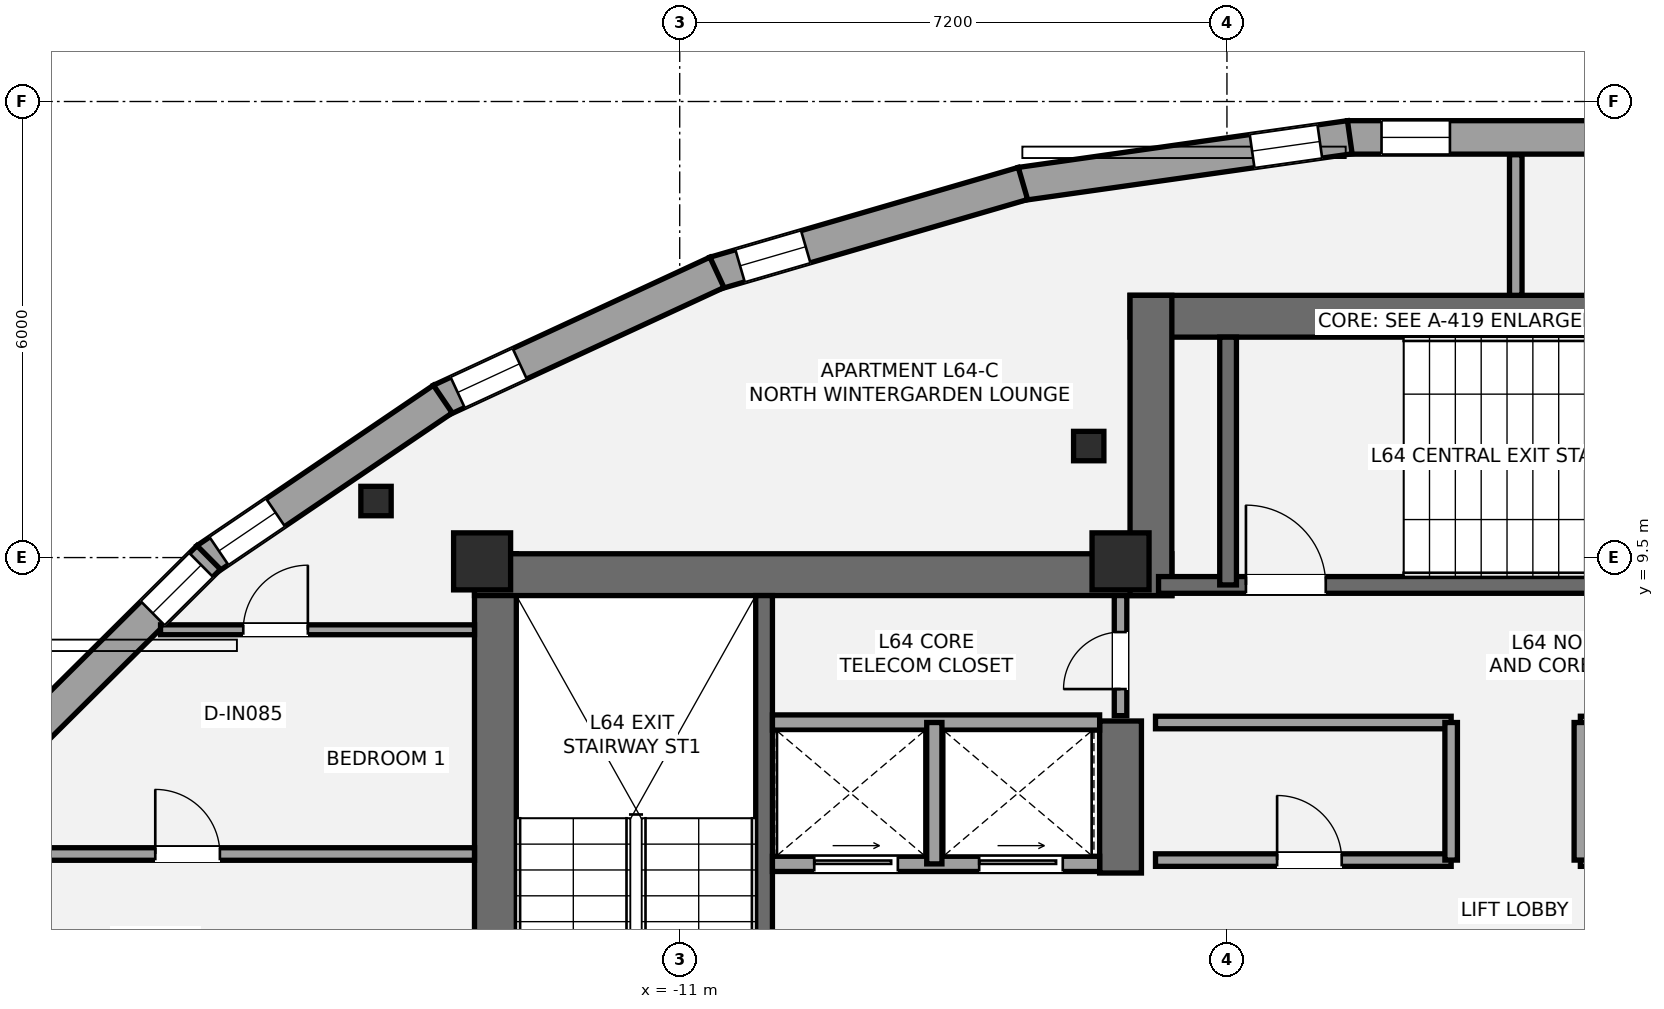
"""IFC4 building model, lengths in metres.
Left out: names, types, materials, properties, quantities, classifications, styles, units other than length and angle.
Written with IfcOpenShell. Run it as: python <this file> out.ifc"""

import sys

from ifc_helpers import new_model, si_unit, direction, frame, frame_2d, origin, origin_2d, place, context, subcontext, project, spatial, rectangle, i_section, extrude, element, fill, save


model = new_model("IFC4")
c1 = context("Model", 3, precision=1e-05, world=origin(), true_north=direction((0.0, 1.0)))
c2 = subcontext(c1, "Body", "Model", "MODEL_VIEW")
j1 = project(units=[si_unit("LENGTHUNIT", "METRE"), si_unit("PLANEANGLEUNIT", "RADIAN")], contexts=[c1])
p1 = place(None, origin())
s1 = spatial("IfcSite", under=j1, at=p1, CompositionType="ELEMENT")
p2 = place(p1, origin())
s2 = spatial("IfcBuilding", under=s1, at=p2, CompositionType="ELEMENT")
p3 = place(p2, frame((0.0, 0.0, 228.9)))
s3 = spatial("IfcBuildingStorey", under=s2, at=p3, CompositionType="ELEMENT", Elevation=228.9)
p4 = place(p3, frame((-13.425, 1.3, 0.0), z_axis=(0.0, 0.0, 1.0), x_axis=(0.0, 1.0, 0.0)))
e1 = element("IfcWall", 1, at=p4, inside=s3, PredefinedType="SHEAR", context=c2, shape_type="SweptSolid", body=[
    extrude(rectangle(XDim=8.25, YDim=0.55, at=frame_2d((4.125, 0.0))), origin(), (0.0, 0.0, 1.0), 3.15),
])
p5 = place(p3, frame((-13.7, 9.275, 0.0), z_axis=(0.0, 0.0, 1.0), x_axis=(1.0, 0.0, 0.0)))
e2 = element("IfcWall", 2, at=p5, inside=s3, PredefinedType="SHEAR", context=c2, shape_type="SweptSolid", body=[
    extrude(rectangle(XDim=9.175, YDim=0.55, at=frame_2d((4.587, 0.0))), origin(), (0.0, 0.0, 1.0), 3.15),
])
p6 = place(p3, frame((-5.2, 5.35, 0.0), z_axis=(0.0, 0.0, 1.0), x_axis=(0.0, 1.0, 0.0)))
e3 = element("IfcWall", 3, at=p6, inside=s3, PredefinedType="SHEAR", context=c2, shape_type="SweptSolid", body=[
    extrude(rectangle(XDim=2.0, YDim=0.55, at=frame_2d((1.0, 0.0))), origin(), (0.0, 0.0, 1.0), 3.15),
])
p7 = place(p3, frame((-9.89, 1.85, 0.0), z_axis=(0.0, 0.0, 1.0), x_axis=(0.0, 1.0, 0.0)))
e4 = element("IfcWall", 4, at=p7, inside=s3, PredefinedType="SHEAR", context=c2, shape_type="SweptSolid", body=[
    extrude(rectangle(XDim=7.15, YDim=0.22, at=frame_2d((3.575, 0.0))), origin(), (0.0, 0.0, 1.0), 3.15),
])
p8 = place(p3, frame((-5.075, 12.675, 0.0), z_axis=(0.0, 0.0, 1.0), x_axis=(1.0, 0.0, 0.0)))
e5 = element("IfcWall", 5, at=p8, inside=s3, PredefinedType="SHEAR", context=c2, shape_type="SweptSolid", body=[
    extrude(rectangle(XDim=10.15, YDim=0.55, at=frame_2d((5.075, 0.0))), origin(), (0.0, 0.0, 1.0), 3.15),
])
p9 = place(p3, frame((-4.8, 9.0, 0.0), z_axis=(0.0, 0.0, 1.0), x_axis=(0.0, 1.0, 0.0)))
e6 = element("IfcWall", 6, at=p9, inside=s3, PredefinedType="SHEAR", context=c2, shape_type="SweptSolid", body=[
    extrude(rectangle(XDim=3.95, YDim=0.55, at=frame_2d((1.975, 0.0))), origin(), (0.0, 0.0, 1.0), 3.15),
])
p10 = place(p3, frame((-4.7, 9.14, 0.0), z_axis=(0.0, 0.0, 1.0), x_axis=(1.0, 0.0, 0.0)))
e7 = element("IfcWall", 7, at=p10, inside=s3, PredefinedType="SHEAR", context=c2, shape_type="SweptSolid", body=[
    extrude(rectangle(XDim=9.3, YDim=0.22, at=frame_2d((4.65, 0.0))), origin(), (0.0, 0.0, 1.0), 3.15),
])
p11 = place(p10, frame((1.15, 0.0, 0.0)))
e8 = element("IfcOpeningElement", 8, at=p11, cuts=e7, PredefinedType="OPENING", context=c2, shape_type="SweptSolid", body=[
    extrude(rectangle(XDim=1.05, YDim=2.15, at=frame_2d((0.525, 1.075))), frame((0.0, 0.12, 0.0), z_axis=(0.0, -1.0, 0.0), x_axis=(1.0, 0.0, 0.0)), (0.0, 0.0, 1.0), 0.24),
])
p12 = place(p3, frame((-3.785, 9.14, 0.0), z_axis=(0.0, 0.0, 1.0), x_axis=(0.0, 1.0, 0.0)))
e9 = element("IfcWall", 9, at=p12, inside=s3, PredefinedType="SHEAR", context=c2, shape_type="SweptSolid", body=[
    extrude(rectangle(XDim=3.26, YDim=0.22, at=frame_2d((1.63, 0.0))), origin(), (0.0, 0.0, 1.0), 3.15),
])
for number, where, z_axis, x_axis in (
    (10, (-13.6, 9.45, 0.0), (0.0, 0.0, 1.0), (1.0, 0.0, 0.0)),
    (11, (-5.2, 9.45, 0.0), (0.0, 0.0, 1.0), (1.0, 0.0, 0.0)),
):
    element("IfcColumn", number, at=place(p3, frame(where, z_axis=z_axis, x_axis=x_axis)), inside=s3, PredefinedType="PILASTER", context=c2, shape_type="SweptSolid", body=[
        extrude(rectangle(XDim=0.75, YDim=0.75, at=origin_2d()), origin(), (0.0, 0.0, 1.0), 3.15),
    ])
for number, where, z_axis, x_axis in (
    (12, (-5.619, 10.967, 0.0), (0.0, 0.0, 1.0), (1.0, 0.0, 0.0)),
    (13, (-14.996, 10.244, 0.0), (0.0, 0.0, 1.0), (1.0, 0.0, 0.0)),
):
    element("IfcColumn", number, at=place(p3, frame(where, z_axis=z_axis, x_axis=x_axis)), inside=s3, PredefinedType="COLUMN", context=c2, shape_type="SweptSolid", body=[
        extrude(i_section(OverallWidth=0.399, OverallDepth=0.387, WebThickness=0.021, FlangeThickness=0.033, at=origin_2d()), origin(), (0.0, 0.0, 1.0), 3.15),
    ])
p13 = place(p3, frame((-2.215, 15.028, 0.0), z_axis=(0.0, 0.0, 1.0), x_axis=(1.0, 0.0, 0.0)))
e14 = element("IfcWall", 14, at=p13, inside=s3, PredefinedType="STANDARD", context=c2, shape_type="SweptSolid", body=[
    extrude(rectangle(XDim=4.429, YDim=0.44, at=frame_2d((2.215, 0.0))), origin(), (0.0, 0.0, 1.0), 2.336),
])
p14 = place(p13, frame((0.448, 0.0, 0.58)))
e15 = element("IfcOpeningElement", 15, at=p14, cuts=e14, PredefinedType="OPENING", context=c2, shape_type="SweptSolid", body=[
    extrude(rectangle(XDim=0.9, YDim=1.35, at=frame_2d((0.45, 0.675))), frame((0.0, 0.23, 0.0), z_axis=(0.0, -1.0, 0.0), x_axis=(1.0, 0.0, 0.0)), (0.0, 0.0, 1.0), 0.46),
])
p15 = place(p3, frame((-6.515, 14.415, 0.0), z_axis=(0.0, 0.0, 1.0), x_axis=(0.990076340622, 0.140530565146, 0.0)))
e16 = element("IfcWall", 16, at=p15, inside=s3, PredefinedType="STANDARD", context=c2, shape_type="SweptSolid", body=[
    extrude(rectangle(XDim=4.375, YDim=0.44, at=frame_2d((2.187, 0.0))), origin(), (0.0, 0.0, 1.0), 2.336),
])
p16 = place(p15, frame((3.076, 0.0, 0.58)))
e17 = element("IfcOpeningElement", 17, at=p16, cuts=e16, PredefinedType="OPENING", context=c2, shape_type="SweptSolid", body=[
    extrude(rectangle(XDim=0.9, YDim=1.35, at=frame_2d((0.45, 0.675))), frame((0.0, 0.23, 0.0), z_axis=(0.0, -1.0, 0.0), x_axis=(1.0, 0.0, 0.0)), (0.0, 0.0, 1.0), 0.46),
])
p17 = place(p3, frame((-10.541, 13.24, 0.0), z_axis=(0.0, 0.0, 1.0), x_axis=(0.960138362531, 0.279525177393, 0.0)))
e18 = element("IfcWall", 18, at=p17, inside=s3, PredefinedType="STANDARD", context=c2, shape_type="SweptSolid", body=[
    extrude(rectangle(XDim=4.226, YDim=0.44, at=frame_2d((2.113, 0.0))), origin(), (0.0, 0.0, 1.0), 2.336),
])
p18 = place(p17, frame((0.349, 0.0, 0.58)))
e19 = element("IfcOpeningElement", 19, at=p18, cuts=e18, PredefinedType="OPENING", context=c2, shape_type="SweptSolid", body=[
    extrude(rectangle(XDim=0.9, YDim=1.35, at=frame_2d((0.45, 0.675))), frame((0.0, 0.23, 0.0), z_axis=(0.0, -1.0, 0.0), x_axis=(1.0, 0.0, 0.0)), (0.0, 0.0, 1.0), 0.46),
])
p19 = place(p3, frame((-14.148, 11.567, 0.0), z_axis=(0.0, 0.0, 1.0), x_axis=(0.907400682183, 0.420266584412, 0.0)))
e20 = element("IfcWall", 20, at=p19, inside=s3, PredefinedType="STANDARD", context=c2, shape_type="SweptSolid", body=[
    extrude(rectangle(XDim=4.009, YDim=0.44, at=frame_2d((2.004, 0.0))), origin(), (0.0, 0.0, 1.0), 2.336),
])
p20 = place(p19, frame((0.249, 0.0, 0.58)))
e21 = element("IfcOpeningElement", 21, at=p20, cuts=e20, PredefinedType="OPENING", context=c2, shape_type="SweptSolid", body=[
    extrude(rectangle(XDim=0.9, YDim=1.35, at=frame_2d((0.45, 0.675))), frame((0.0, 0.23, 0.0), z_axis=(0.0, -1.0, 0.0), x_axis=(1.0, 0.0, 0.0)), (0.0, 0.0, 1.0), 0.46),
])
p21 = place(p3, frame((-17.228, 9.475, 0.0), z_axis=(0.0, 0.0, 1.0), x_axis=(0.827638454008, 0.561261605178, 0.0)))
e22 = element("IfcWall", 22, at=p21, inside=s3, PredefinedType="STANDARD", context=c2, shape_type="SweptSolid", body=[
    extrude(rectangle(XDim=3.76, YDim=0.44, at=frame_2d((1.88, 0.0))), origin(), (0.0, 0.0, 1.0), 2.336),
])
p22 = place(p21, frame((0.2, 0.0, 0.42)))
e23 = element("IfcOpeningElement", 23, at=p22, cuts=e22, PredefinedType="OPENING", context=c2, shape_type="SweptSolid", body=[
    extrude(rectangle(XDim=0.9, YDim=1.35, at=frame_2d((0.45, 0.675))), frame((0.0, 0.23, 0.0), z_axis=(0.0, -1.0, 0.0), x_axis=(1.0, 0.0, 0.0)), (0.0, 0.0, 1.0), 0.46),
])
p23 = place(p3, frame((-19.681, 7.034, 0.0), z_axis=(0.0, 0.0, 1.0), x_axis=(0.709543258305, 0.704661879623, 0.0)))
e24 = element("IfcWall", 24, at=p23, inside=s3, PredefinedType="STANDARD", context=c2, shape_type="SweptSolid", body=[
    extrude(rectangle(XDim=3.501, YDim=0.44, at=frame_2d((1.75, 0.0))), origin(), (0.0, 0.0, 1.0), 2.336),
])
p24 = place(p23, frame((2.461, 0.0, 0.42)))
e25 = element("IfcOpeningElement", 25, at=p24, cuts=e24, PredefinedType="OPENING", context=c2, shape_type="SweptSolid", body=[
    extrude(rectangle(XDim=0.9, YDim=1.35, at=frame_2d((0.45, 0.675))), frame((0.0, 0.23, 0.0), z_axis=(0.0, -1.0, 0.0), x_axis=(1.0, 0.0, 0.0)), (0.0, 0.0, 1.0), 0.46),
])
p25 = place(p3, frame((-9.78, 5.47, 0.0), z_axis=(0.0, 0.0, 1.0), x_axis=(1.0, 0.0, 0.0)))
e26 = element("IfcWall", 26, at=p25, inside=s3, PredefinedType="SOLIDWALL", context=c2, shape_type="SweptSolid", body=[
    extrude(rectangle(XDim=4.305, YDim=0.2, at=frame_2d((2.152, 0.0))), origin(), (0.0, 0.0, 1.0), 2.97),
])
p26 = place(p25, frame((0.55, 0.0, 0.0)))
e27 = element("IfcOpeningElement", 27, at=p26, cuts=e26, PredefinedType="OPENING", context=c2, shape_type="SweptSolid", body=[
    extrude(rectangle(XDim=1.1, YDim=2.2, at=frame_2d((0.55, 1.1))), frame((0.0, 0.11, 0.0), z_axis=(0.0, -1.0, 0.0), x_axis=(1.0, 0.0, 0.0)), (0.0, 0.0, 1.0), 0.22),
])
p27 = place(p25, frame((2.72, 0.0, 0.0)))
e28 = element("IfcOpeningElement", 28, at=p27, cuts=e26, PredefinedType="OPENING", context=c2, shape_type="SweptSolid", body=[
    extrude(rectangle(XDim=1.1, YDim=2.2, at=frame_2d((0.55, 1.1))), frame((0.0, 0.11, 0.0), z_axis=(0.0, -1.0, 0.0), x_axis=(1.0, 0.0, 0.0)), (0.0, 0.0, 1.0), 0.22),
])
p28 = place(p3, frame((-9.78, 7.33, 0.0), z_axis=(0.0, 0.0, 1.0), x_axis=(1.0, 0.0, 0.0)))
e29 = element("IfcWall", 29, at=p28, inside=s3, PredefinedType="SOLIDWALL", context=c2, shape_type="SweptSolid", body=[
    extrude(rectangle(XDim=4.305, YDim=0.2, at=frame_2d((2.152, 0.0))), origin(), (0.0, 0.0, 1.0), 2.97),
])
p29 = place(p3, frame((-7.65, 5.47, 0.0), z_axis=(0.0, 0.0, 1.0), x_axis=(0.0, 1.0, 0.0)))
e30 = element("IfcWall", 30, at=p29, inside=s3, PredefinedType="SOLIDWALL", context=c2, shape_type="SweptSolid", body=[
    extrude(rectangle(XDim=1.86, YDim=0.2, at=frame_2d((0.93, 0.0))), origin(), (0.0, 0.0, 1.0), 2.97),
])
p30 = place(p3, frame((-4.74, 5.52, 0.0), z_axis=(0.0, 0.0, 1.0), x_axis=(1.0, 0.0, 0.0)))
e31 = element("IfcWall", 31, at=p30, inside=s3, PredefinedType="PARTITIONING", context=c2, shape_type="SweptSolid", body=[
    extrude(rectangle(XDim=3.89, YDim=0.165, at=frame_2d((1.945, 0.0))), origin(), (0.0, 0.0, 1.0), 2.97),
])
p31 = place(p30, frame((1.6, 0.0, 0.0)))
e32 = element("IfcOpeningElement", 32, at=p31, cuts=e31, PredefinedType="OPENING", context=c2, shape_type="SweptSolid", body=[
    extrude(rectangle(XDim=0.85, YDim=2.1, at=frame_2d((0.425, 1.05))), frame((0.0, 0.093, 0.0), z_axis=(0.0, -1.0, 0.0), x_axis=(1.0, 0.0, 0.0)), (0.0, 0.0, 1.0), 0.185),
])
p32 = place(p3, frame((-4.74, 7.33, 0.0), z_axis=(0.0, 0.0, 1.0), x_axis=(1.0, 0.0, 0.0)))
e33 = element("IfcWall", 33, at=p32, inside=s3, PredefinedType="PARTITIONING", context=c2, shape_type="SweptSolid", body=[
    extrude(rectangle(XDim=3.89, YDim=0.165, at=frame_2d((1.945, 0.0))), origin(), (0.0, 0.0, 1.0), 2.97),
])
p33 = place(p3, frame((-0.85, 5.52, 0.0), z_axis=(0.0, 0.0, 1.0), x_axis=(0.0, 1.0, 0.0)))
e34 = element("IfcWall", 34, at=p33, inside=s3, PredefinedType="PARTITIONING", context=c2, shape_type="SweptSolid", body=[
    extrude(rectangle(XDim=1.81, YDim=0.165, at=frame_2d((0.905, 0.0))), origin(), (0.0, 0.0, 1.0), 2.97),
])
p34 = place(p3, frame((0.85, 5.52, 0.0), z_axis=(0.0, 0.0, 1.0), x_axis=(1.0, 0.0, 0.0)))
e35 = element("IfcWall", 35, at=p34, inside=s3, PredefinedType="PARTITIONING", context=c2, shape_type="SweptSolid", body=[
    extrude(rectangle(XDim=3.89, YDim=0.165, at=frame_2d((1.945, 0.0))), origin(), (0.0, 0.0, 1.0), 2.97),
])
p35 = place(p34, frame((1.6, 0.0, 0.0)))
e36 = element("IfcOpeningElement", 36, at=p35, cuts=e35, PredefinedType="OPENING", context=c2, shape_type="SweptSolid", body=[
    extrude(rectangle(XDim=0.85, YDim=2.1, at=frame_2d((0.425, 1.05))), frame((0.0, 0.093, 0.0), z_axis=(0.0, -1.0, 0.0), x_axis=(1.0, 0.0, 0.0)), (0.0, 0.0, 1.0), 0.185),
])
p36 = place(p3, frame((0.85, 7.33, 0.0), z_axis=(0.0, 0.0, 1.0), x_axis=(1.0, 0.0, 0.0)))
e37 = element("IfcWall", 37, at=p36, inside=s3, PredefinedType="PARTITIONING", context=c2, shape_type="SweptSolid", body=[
    extrude(rectangle(XDim=3.89, YDim=0.165, at=frame_2d((1.945, 0.0))), origin(), (0.0, 0.0, 1.0), 2.97),
])
p37 = place(p3, frame((0.85, 5.52, 0.0), z_axis=(0.0, 0.0, 1.0), x_axis=(0.0, 1.0, 0.0)))
e38 = element("IfcWall", 38, at=p37, inside=s3, PredefinedType="PARTITIONING", context=c2, shape_type="SweptSolid", body=[
    extrude(rectangle(XDim=1.81, YDim=0.165, at=frame_2d((0.905, 0.0))), origin(), (0.0, 0.0, 1.0), 2.97),
])
p38 = place(p3, frame((-5.2, 7.42, 0.0), z_axis=(0.0, 0.0, 1.0), x_axis=(0.0, 1.0, 0.0)))
e39 = element("IfcWall", 39, at=p38, inside=s3, PredefinedType="PARTITIONING", context=c2, shape_type="SweptSolid", body=[
    extrude(rectangle(XDim=1.58, YDim=0.165, at=frame_2d((0.79, 0.0))), origin(), (0.0, 0.0, 1.0), 2.97),
])
p39 = place(p38, frame((0.35, 0.0, 0.0)))
e40 = element("IfcOpeningElement", 40, at=p39, cuts=e39, PredefinedType="OPENING", context=c2, shape_type="SweptSolid", body=[
    extrude(rectangle(XDim=0.75, YDim=2.1, at=frame_2d((0.375, 1.05))), frame((0.0, 0.093, 0.0), z_axis=(0.0, -1.0, 0.0), x_axis=(1.0, 0.0, 0.0)), (0.0, 0.0, 1.0), 0.185),
])
p40 = place(p3, frame((0.0, 12.95, 0.0), z_axis=(0.0, 0.0, 1.0), x_axis=(0.0, 1.0, 0.0)))
e41 = element("IfcWall", 41, at=p40, inside=s3, PredefinedType="PARTITIONING", context=c2, shape_type="SweptSolid", body=[
    extrude(rectangle(XDim=1.85, YDim=0.165, at=frame_2d((0.925, 0.0))), origin(), (0.0, 0.0, 1.0), 2.97),
])
p41 = place(p3, frame((-20.312, 5.6, 0.0), z_axis=(0.0, 0.0, 1.0), x_axis=(1.0, 0.0, 0.0)))
e42 = element("IfcWall", 42, at=p41, inside=s3, PredefinedType="PARTITIONING", context=c2, shape_type="SweptSolid", body=[
    extrude(rectangle(XDim=6.612, YDim=0.165, at=frame_2d((3.306, 0.0))), origin(), (0.0, 0.0, 1.0), 2.423),
])
p42 = place(p41, frame((2.412, 0.0, 0.0)))
e43 = element("IfcOpeningElement", 43, at=p42, cuts=e42, PredefinedType="OPENING", context=c2, shape_type="SweptSolid", body=[
    extrude(rectangle(XDim=0.85, YDim=2.1, at=frame_2d((0.425, 1.05))), frame((0.0, 0.093, 0.0), z_axis=(0.0, -1.0, 0.0), x_axis=(1.0, 0.0, 0.0)), (0.0, 0.0, 1.0), 0.185),
])
p43 = place(p3, frame((-17.831, 8.55, 0.0), z_axis=(0.0, 0.0, 1.0), x_axis=(1.0, 0.0, 0.0)))
e44 = element("IfcWall", 44, at=p43, inside=s3, PredefinedType="PARTITIONING", context=c2, shape_type="SweptSolid", body=[
    extrude(rectangle(XDim=4.131, YDim=0.13, at=frame_2d((2.065, 0.0))), origin(), (0.0, 0.0, 1.0), 2.423),
])
p44 = place(p43, frame((1.088, 0.0, 0.0)))
e45 = element("IfcOpeningElement", 45, at=p44, cuts=e44, PredefinedType="OPENING", context=c2, shape_type="SweptSolid", body=[
    extrude(rectangle(XDim=0.85, YDim=2.1, at=frame_2d((0.425, 1.05))), frame((0.0, 0.075, 0.0), z_axis=(0.0, -1.0, 0.0), x_axis=(1.0, 0.0, 0.0)), (0.0, 0.0, 1.0), 0.15),
])
p45 = place(p14, origin())
e46 = element("IfcWindow", 46, at=p45, inside=s3, PartitioningType="SINGLE_PANEL", PredefinedType="WINDOW", context=c2, shape_type="SweptSolid", body=[
    extrude(rectangle(XDim=0.9, YDim=1.35, at=frame_2d((0.45, 0.675))), frame((0.0, -0.01, 0.0), z_axis=(0.0, -1.0, 0.0), x_axis=(1.0, 0.0, 0.0)), (0.0, 0.0, 1.0), 0.06),
])
fill(e15, e46)
p46 = place(p16, origin())
e47 = element("IfcWindow", 47, at=p46, inside=s3, PartitioningType="SINGLE_PANEL", PredefinedType="WINDOW", context=c2, shape_type="SweptSolid", body=[
    extrude(rectangle(XDim=0.9, YDim=1.35, at=frame_2d((0.45, 0.675))), frame((0.0, -0.01, 0.0), z_axis=(0.0, -1.0, 0.0), x_axis=(1.0, 0.0, 0.0)), (0.0, 0.0, 1.0), 0.06),
])
fill(e17, e47)
p47 = place(p18, origin())
e48 = element("IfcWindow", 48, at=p47, inside=s3, PartitioningType="SINGLE_PANEL", PredefinedType="WINDOW", context=c2, shape_type="SweptSolid", body=[
    extrude(rectangle(XDim=0.9, YDim=1.35, at=frame_2d((0.45, 0.675))), frame((0.0, -0.01, 0.0), z_axis=(0.0, -1.0, 0.0), x_axis=(1.0, 0.0, 0.0)), (0.0, 0.0, 1.0), 0.06),
])
fill(e19, e48)
p48 = place(p20, origin())
e49 = element("IfcWindow", 49, at=p48, inside=s3, PartitioningType="SINGLE_PANEL", PredefinedType="WINDOW", context=c2, shape_type="SweptSolid", body=[
    extrude(rectangle(XDim=0.9, YDim=1.35, at=frame_2d((0.45, 0.675))), frame((0.0, -0.01, 0.0), z_axis=(0.0, -1.0, 0.0), x_axis=(1.0, 0.0, 0.0)), (0.0, 0.0, 1.0), 0.06),
])
fill(e21, e49)
p49 = place(p22, origin())
e50 = element("IfcWindow", 50, at=p49, inside=s3, PartitioningType="SINGLE_PANEL", PredefinedType="WINDOW", context=c2, shape_type="SweptSolid", body=[
    extrude(rectangle(XDim=0.9, YDim=1.35, at=frame_2d((0.45, 0.675))), frame((0.0, -0.01, 0.0), z_axis=(0.0, -1.0, 0.0), x_axis=(1.0, 0.0, 0.0)), (0.0, 0.0, 1.0), 0.06),
])
fill(e23, e50)
p50 = place(p24, origin())
e51 = element("IfcWindow", 51, at=p50, inside=s3, PartitioningType="SINGLE_PANEL", PredefinedType="WINDOW", context=c2, shape_type="SweptSolid", body=[
    extrude(rectangle(XDim=0.9, YDim=1.35, at=frame_2d((0.45, 0.675))), frame((0.0, -0.01, 0.0), z_axis=(0.0, -1.0, 0.0), x_axis=(1.0, 0.0, 0.0)), (0.0, 0.0, 1.0), 0.06),
])
fill(e25, e51)
p51 = place(p11, origin())
e52 = element("IfcDoor", 52, at=p51, inside=s3, OperationType="SINGLE_SWING_LEFT", PredefinedType="DOOR", context=c2, shape_type="SweptSolid", body=[
    extrude(rectangle(XDim=1.05, YDim=2.15, at=frame_2d((0.525, 1.075))), frame((0.0, 0.025, 0.0), z_axis=(0.0, -1.0, 0.0), x_axis=(1.0, 0.0, 0.0)), (0.0, 0.0, 1.0), 0.05),
])
fill(e8, e52)
p52 = place(p26, origin())
e53 = element("IfcDoor", 53, at=p52, inside=s3, OperationType="SLIDING_TO_LEFT", PredefinedType="DOOR", context=c2, shape_type="SweptSolid", body=[
    extrude(rectangle(XDim=1.1, YDim=2.2, at=frame_2d((0.55, 1.1))), frame((0.0, 0.025, 0.0), z_axis=(0.0, -1.0, 0.0), x_axis=(1.0, 0.0, 0.0)), (0.0, 0.0, 1.0), 0.05),
])
fill(e27, e53)
p53 = place(p27, origin())
e54 = element("IfcDoor", 54, at=p53, inside=s3, OperationType="SLIDING_TO_LEFT", PredefinedType="DOOR", context=c2, shape_type="SweptSolid", body=[
    extrude(rectangle(XDim=1.1, YDim=2.2, at=frame_2d((0.55, 1.1))), frame((0.0, 0.025, 0.0), z_axis=(0.0, -1.0, 0.0), x_axis=(1.0, 0.0, 0.0)), (0.0, 0.0, 1.0), 0.05),
])
fill(e28, e54)
p54 = place(p31, origin())
e55 = element("IfcDoor", 55, at=p54, inside=s3, OperationType="SINGLE_SWING_LEFT", PredefinedType="DOOR", context=c2, shape_type="SweptSolid", body=[
    extrude(rectangle(XDim=0.85, YDim=2.1, at=frame_2d((0.425, 1.05))), frame((0.0, 0.025, 0.0), z_axis=(0.0, -1.0, 0.0), x_axis=(1.0, 0.0, 0.0)), (0.0, 0.0, 1.0), 0.05),
])
fill(e32, e55)
p55 = place(p39, origin())
e56 = element("IfcDoor", 56, at=p55, inside=s3, OperationType="SINGLE_SWING_LEFT", PredefinedType="DOOR", context=c2, shape_type="SweptSolid", body=[
    extrude(rectangle(XDim=0.75, YDim=2.1, at=frame_2d((0.375, 1.05))), frame((0.0, 0.025, 0.0), z_axis=(0.0, -1.0, 0.0), x_axis=(1.0, 0.0, 0.0)), (0.0, 0.0, 1.0), 0.05),
])
fill(e40, e56)
p56 = place(p42, origin())
e57 = element("IfcDoor", 57, at=p56, inside=s3, OperationType="SINGLE_SWING_LEFT", PredefinedType="DOOR", context=c2, shape_type="SweptSolid", body=[
    extrude(rectangle(XDim=0.85, YDim=2.1, at=frame_2d((0.425, 1.05))), frame((0.0, 0.025, 0.0), z_axis=(0.0, -1.0, 0.0), x_axis=(1.0, 0.0, 0.0)), (0.0, 0.0, 1.0), 0.05),
])
fill(e43, e57)
p57 = place(p44, origin())
e58 = element("IfcDoor", 58, at=p57, inside=s3, OperationType="SINGLE_SWING_RIGHT", PredefinedType="DOOR", context=c2, shape_type="SweptSolid", body=[
    extrude(rectangle(XDim=0.85, YDim=2.1, at=frame_2d((0.425, 1.05))), frame((0.0, 0.025, 0.0), z_axis=(0.0, -1.0, 0.0), x_axis=(1.0, 0.0, 0.0)), (0.0, 0.0, 1.0), 0.05),
])
fill(e45, e58)
save(model, sys.argv[1])
